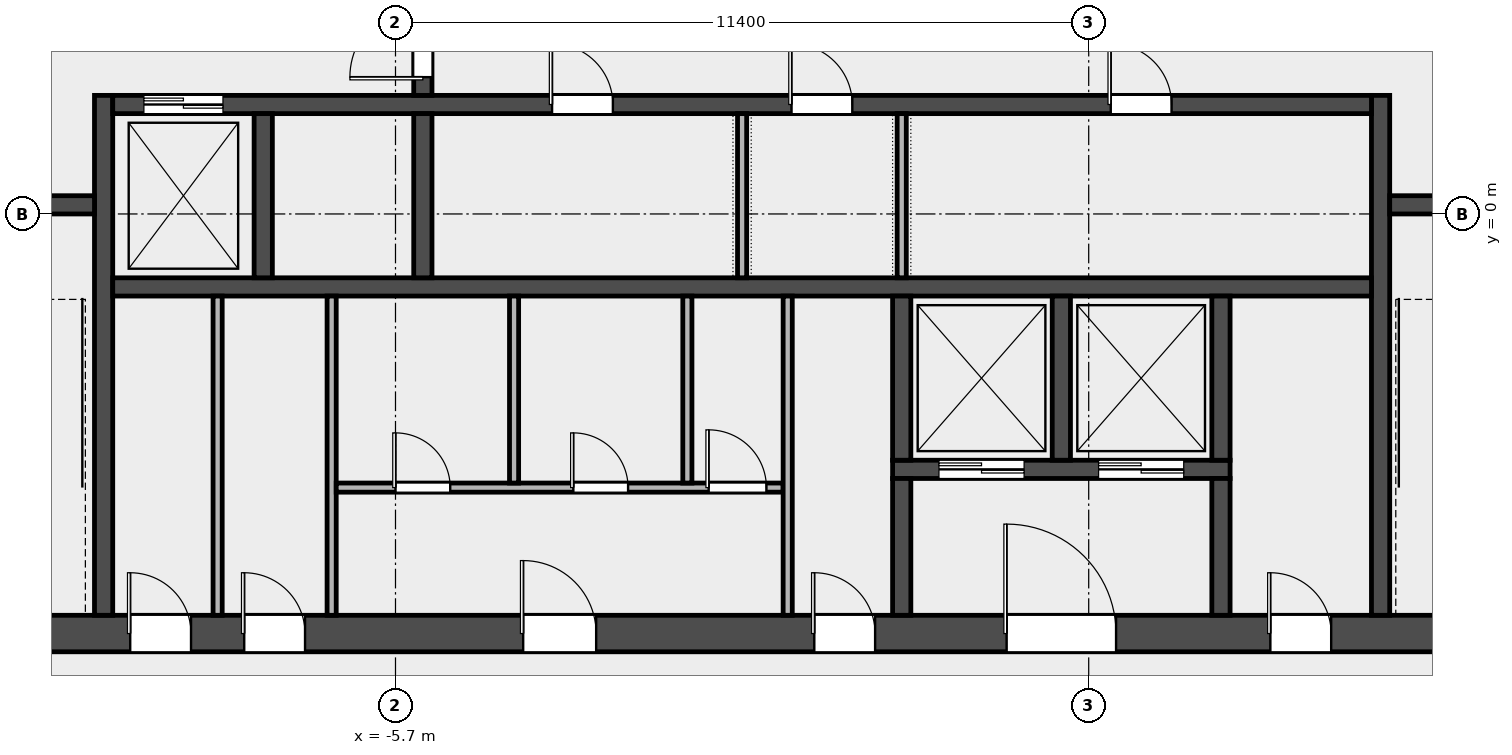
"""IFC4 building model, lengths in metres.
Left out: names, types, materials, properties, quantities, classifications, styles, units other than length and angle.
Written with IfcOpenShell. Run it as: python <this file> out.ifc"""

import sys

from ifc_helpers import new_model, si_unit, direction, frame, frame_2d, origin, place, context, subcontext, project, spatial, rectangle, extrude, element, fill, save


model = new_model("IFC4")
c1 = context("Model", 3, precision=1e-05, world=origin(), true_north=direction((0.0, 1.0)))
c2 = subcontext(c1, "Body", "Model", "MODEL_VIEW")
j1 = project(units=[si_unit("LENGTHUNIT", "METRE"), si_unit("PLANEANGLEUNIT", "RADIAN")], contexts=[c1])
p1 = place(None, origin())
s1 = spatial("IfcSite", under=j1, at=p1, CompositionType="ELEMENT")
p2 = place(p1, origin())
s2 = spatial("IfcBuilding", under=s1, at=p2, CompositionType="ELEMENT")
p3 = place(p2, frame((0.0, 0.0, 311.4)))
s3 = spatial("IfcBuildingStorey", under=s2, at=p3, CompositionType="ELEMENT", Elevation=311.4)
p4 = place(p3, frame((-14.4, -6.9, 0.0), z_axis=(0.0, 0.0, 1.0), x_axis=(1.0, 0.0, 0.0)))
e1 = element("IfcWall", 1, at=p4, inside=s3, PredefinedType="SHEAR", context=c2, shape_type="SweptSolid", body=[
    extrude(rectangle(XDim=28.8, YDim=0.6, at=frame_2d((14.4, 0.0))), origin(), (0.0, 0.0, 1.0), 3.7),
])
p5 = place(p4, frame((4.337, 0.0, 0.0)))
e2 = element("IfcOpeningElement", 2, at=p5, cuts=e1, PredefinedType="OPENING", context=c2, shape_type="SweptSolid", body=[
    extrude(rectangle(XDim=1.0, YDim=2.1, at=frame_2d((0.5, 1.05))), frame((0.0, 0.312, 0.0), z_axis=(0.0, -1.0, 0.0), x_axis=(1.0, 0.0, 0.0)), (0.0, 0.0, 1.0), 0.624),
])
p6 = place(p4, frame((6.212, 0.0, 0.0)))
e3 = element("IfcOpeningElement", 3, at=p6, cuts=e1, PredefinedType="OPENING", context=c2, shape_type="SweptSolid", body=[
    extrude(rectangle(XDim=1.0, YDim=2.1, at=frame_2d((0.5, 1.05))), frame((0.0, 0.312, 0.0), z_axis=(0.0, -1.0, 0.0), x_axis=(1.0, 0.0, 0.0)), (0.0, 0.0, 1.0), 0.624),
])
p7 = place(p4, frame((10.8, 0.0, 0.0)))
e4 = element("IfcOpeningElement", 4, at=p7, cuts=e1, PredefinedType="OPENING", context=c2, shape_type="SweptSolid", body=[
    extrude(rectangle(XDim=1.2, YDim=2.1, at=frame_2d((0.6, 1.05))), frame((0.0, 0.312, 0.0), z_axis=(0.0, -1.0, 0.0), x_axis=(1.0, 0.0, 0.0)), (0.0, 0.0, 1.0), 0.624),
])
p8 = place(p4, frame((15.587, 0.0, 0.0)))
e5 = element("IfcOpeningElement", 5, at=p8, cuts=e1, PredefinedType="OPENING", context=c2, shape_type="SweptSolid", body=[
    extrude(rectangle(XDim=1.0, YDim=2.1, at=frame_2d((0.5, 1.05))), frame((0.0, 0.312, 0.0), z_axis=(0.0, -1.0, 0.0), x_axis=(1.0, 0.0, 0.0)), (0.0, 0.0, 1.0), 0.624),
])
p9 = place(p4, frame((18.75, 0.0, 0.0)))
e6 = element("IfcOpeningElement", 6, at=p9, cuts=e1, PredefinedType="OPENING", context=c2, shape_type="SweptSolid", body=[
    extrude(rectangle(XDim=1.8, YDim=2.1, at=frame_2d((0.9, 1.05))), frame((0.0, 0.312, 0.0), z_axis=(0.0, -1.0, 0.0), x_axis=(1.0, 0.0, 0.0)), (0.0, 0.0, 1.0), 0.624),
])
p10 = place(p4, frame((23.087, 0.0, 0.0)))
e7 = element("IfcOpeningElement", 7, at=p10, cuts=e1, PredefinedType="OPENING", context=c2, shape_type="SweptSolid", body=[
    extrude(rectangle(XDim=1.0, YDim=2.1, at=frame_2d((0.5, 1.05))), frame((0.0, 0.312, 0.0), z_axis=(0.0, -1.0, 0.0), x_axis=(1.0, 0.0, 0.0)), (0.0, 0.0, 1.0), 0.624),
])
for number, where, z_axis, x_axis in (
    (8, (-10.5, -6.6, 0.0), (0.0, 0.0, 1.0), (0.0, 1.0, 0.0)),
    (9, (10.5, -6.6, 0.0), (0.0, 0.0, 1.0), (0.0, 1.0, 0.0)),
):
    element("IfcWall", number, at=place(p3, frame(where, z_axis=z_axis, x_axis=x_axis)), inside=s3, PredefinedType="SHEAR", context=c2, shape_type="SweptSolid", body=[
        extrude(rectangle(XDim=8.55, YDim=0.3, at=frame_2d((4.275, 0.0))), origin(), (0.0, 0.0, 1.0), 3.7),
    ])
p11 = place(p3, frame((-13.8, 0.15, 0.0), z_axis=(0.0, 0.0, 1.0), x_axis=(1.0, 0.0, 0.0)))
e10 = element("IfcWall", 10, at=p11, inside=s3, PredefinedType="SOLIDWALL", context=c2, shape_type="SweptSolid", body=[
    extrude(rectangle(XDim=3.15, YDim=0.3, at=frame_2d((1.575, 0.0))), origin(), (0.0, 0.0, 1.0), 3.7),
])
p12 = place(p11, frame((0.975, 0.0, 0.0)))
e11 = element("IfcOpeningElement", 11, at=p12, cuts=e10, PredefinedType="OPENING", context=c2, shape_type="SweptSolid", body=[
    extrude(rectangle(XDim=1.1, YDim=2.1, at=frame_2d((0.55, 1.05))), frame((0.0, 0.162, 0.0), z_axis=(0.0, -1.0, 0.0), x_axis=(1.0, 0.0, 0.0)), (0.0, 0.0, 1.0), 0.324),
])
p13 = place(p3, frame((10.65, 0.15, 0.0), z_axis=(0.0, 0.0, 1.0), x_axis=(1.0, 0.0, 0.0)))
e12 = element("IfcWall", 12, at=p13, inside=s3, PredefinedType="SOLIDWALL", context=c2, shape_type="SweptSolid", body=[
    extrude(rectangle(XDim=3.15, YDim=0.3, at=frame_2d((1.575, 0.0))), origin(), (0.0, 0.0, 1.0), 3.7),
])
p14 = place(p13, frame((1.025, 0.0, 0.0)))
e13 = element("IfcOpeningElement", 13, at=p14, cuts=e12, PredefinedType="OPENING", context=c2, shape_type="SweptSolid", body=[
    extrude(rectangle(XDim=1.1, YDim=2.1, at=frame_2d((0.55, 1.05))), frame((0.0, 0.162, 0.0), z_axis=(0.0, -1.0, 0.0), x_axis=(1.0, 0.0, 0.0)), (0.0, 0.0, 1.0), 0.324),
])
p15 = place(p3, frame((-10.35, -1.2, 0.0), z_axis=(0.0, 0.0, 1.0), x_axis=(1.0, 0.0, 0.0)))
e14 = element("IfcWall", 14, at=p15, inside=s3, PredefinedType="SOLIDWALL", context=c2, shape_type="SweptSolid", body=[
    extrude(rectangle(XDim=20.7, YDim=0.3, at=frame_2d((10.35, 0.0))), origin(), (0.0, 0.0, 1.0), 3.7),
])
p16 = place(p3, frame((-10.35, 1.8, 0.0), z_axis=(0.0, 0.0, 1.0), x_axis=(1.0, 0.0, 0.0)))
e15 = element("IfcWall", 15, at=p16, inside=s3, PredefinedType="SOLIDWALL", context=c2, shape_type="SweptSolid", body=[
    extrude(rectangle(XDim=20.7, YDim=0.3, at=frame_2d((10.35, 0.0))), origin(), (0.0, 0.0, 1.0), 3.7),
])
p17 = place(p16, frame((0.512, 0.0, 0.0)))
e16 = element("IfcOpeningElement", 16, at=p17, cuts=e15, PredefinedType="OPENING", context=c2, shape_type="SweptSolid", body=[
    extrude(rectangle(XDim=1.3, YDim=2.1, at=frame_2d((0.65, 1.05))), frame((0.0, 0.162, 0.0), z_axis=(0.0, -1.0, 0.0), x_axis=(1.0, 0.0, 0.0)), (0.0, 0.0, 1.0), 0.324),
])
p18 = place(p16, frame((7.225, 0.0, 0.0)))
e17 = element("IfcOpeningElement", 17, at=p18, cuts=e15, PredefinedType="OPENING", context=c2, shape_type="SweptSolid", body=[
    extrude(rectangle(XDim=1.0, YDim=2.1, at=frame_2d((0.5, 1.05))), frame((0.0, 0.162, 0.0), z_axis=(0.0, -1.0, 0.0), x_axis=(1.0, 0.0, 0.0)), (0.0, 0.0, 1.0), 0.324),
])
p19 = place(p16, frame((11.163, 0.0, 0.0)))
e18 = element("IfcOpeningElement", 18, at=p19, cuts=e15, PredefinedType="OPENING", context=c2, shape_type="SweptSolid", body=[
    extrude(rectangle(XDim=1.0, YDim=2.1, at=frame_2d((0.5, 1.05))), frame((0.0, 0.162, 0.0), z_axis=(0.0, -1.0, 0.0), x_axis=(1.0, 0.0, 0.0)), (0.0, 0.0, 1.0), 0.324),
])
p20 = place(p16, frame((16.413, 0.0, 0.0)))
e19 = element("IfcOpeningElement", 19, at=p20, cuts=e15, PredefinedType="OPENING", context=c2, shape_type="SweptSolid", body=[
    extrude(rectangle(XDim=1.0, YDim=2.1, at=frame_2d((0.5, 1.05))), frame((0.0, 0.162, 0.0), z_axis=(0.0, -1.0, 0.0), x_axis=(1.0, 0.0, 0.0)), (0.0, 0.0, 1.0), 0.324),
])
for number, where, z_axis, x_axis in (
    (20, (-7.875, -1.05, 0.0), (0.0, 0.0, 1.0), (0.0, 1.0, 0.0)),
    (21, (-5.25, -1.05, 0.0), (0.0, 0.0, 1.0), (0.0, 1.0, 0.0)),
):
    element("IfcWall", number, at=place(p3, frame(where, z_axis=z_axis, x_axis=x_axis)), inside=s3, PredefinedType="SOLIDWALL", context=c2, shape_type="SweptSolid", body=[
        extrude(rectangle(XDim=2.7, YDim=0.3, at=frame_2d((1.35, 0.0))), origin(), (0.0, 0.0, 1.0), 3.7),
    ])
p21 = place(p3, frame((-5.25, 1.95, 0.0), z_axis=(0.0, 0.0, 1.0), x_axis=(0.0, 1.0, 0.0)))
e22 = element("IfcWall", 22, at=p21, inside=s3, PredefinedType="SOLIDWALL", context=c2, shape_type="SweptSolid", body=[
    extrude(rectangle(XDim=3.3, YDim=0.3, at=frame_2d((1.65, 0.0))), origin(), (0.0, 0.0, 1.0), 3.7),
])
p22 = place(p21, frame((0.3, 0.0, 0.0)))
e23 = element("IfcOpeningElement", 23, at=p22, cuts=e22, PredefinedType="OPENING", context=c2, shape_type="SweptSolid", body=[
    extrude(rectangle(XDim=1.2, YDim=2.1, at=frame_2d((0.6, 1.05))), frame((0.0, 0.162, 0.0), z_axis=(0.0, -1.0, 0.0), x_axis=(1.0, 0.0, 0.0)), (0.0, 0.0, 1.0), 0.324),
])
p23 = place(p21, frame((1.8, 0.0, 0.0)))
e24 = element("IfcOpeningElement", 24, at=p23, cuts=e22, PredefinedType="OPENING", context=c2, shape_type="SweptSolid", body=[
    extrude(rectangle(XDim=1.2, YDim=2.1, at=frame_2d((0.6, 1.05))), frame((0.0, 0.162, 0.0), z_axis=(0.0, -1.0, 0.0), x_axis=(1.0, 0.0, 0.0)), (0.0, 0.0, 1.0), 0.324),
])
p24 = place(p3, frame((2.475, -4.2, 0.0), z_axis=(0.0, 0.0, 1.0), x_axis=(1.0, 0.0, 0.0)))
e25 = element("IfcWall", 25, at=p24, inside=s3, PredefinedType="SOLIDWALL", context=c2, shape_type="SweptSolid", body=[
    extrude(rectangle(XDim=5.55, YDim=0.3, at=frame_2d((2.775, 0.0))), origin(), (0.0, 0.0, 1.0), 3.7),
])
p25 = place(p24, frame((0.762, 0.0, 0.0)))
e26 = element("IfcOpeningElement", 26, at=p25, cuts=e25, PredefinedType="OPENING", context=c2, shape_type="SweptSolid", body=[
    extrude(rectangle(XDim=1.4, YDim=2.1, at=frame_2d((0.7, 1.05))), frame((0.0, 0.162, 0.0), z_axis=(0.0, -1.0, 0.0), x_axis=(1.0, 0.0, 0.0)), (0.0, 0.0, 1.0), 0.324),
])
p26 = place(p24, frame((3.387, 0.0, 0.0)))
e27 = element("IfcOpeningElement", 27, at=p26, cuts=e25, PredefinedType="OPENING", context=c2, shape_type="SweptSolid", body=[
    extrude(rectangle(XDim=1.4, YDim=2.1, at=frame_2d((0.7, 1.05))), frame((0.0, 0.162, 0.0), z_axis=(0.0, -1.0, 0.0), x_axis=(1.0, 0.0, 0.0)), (0.0, 0.0, 1.0), 0.324),
])
p27 = place(p3, frame((2.625, -4.05, 0.0), z_axis=(0.0, 0.0, 1.0), x_axis=(0.0, 1.0, 0.0)))
e28 = element("IfcWall", 28, at=p27, inside=s3, PredefinedType="SOLIDWALL", context=c2, shape_type="SweptSolid", body=[
    extrude(rectangle(XDim=2.7, YDim=0.3, at=frame_2d((1.35, 0.0))), origin(), (0.0, 0.0, 1.0), 3.7),
])
p28 = place(p3, frame((2.625, -6.6, 0.0), z_axis=(0.0, 0.0, 1.0), x_axis=(0.0, 1.0, 0.0)))
e29 = element("IfcWall", 29, at=p28, inside=s3, PredefinedType="SOLIDWALL", context=c2, shape_type="SweptSolid", body=[
    extrude(rectangle(XDim=2.25, YDim=0.3, at=frame_2d((1.125, 0.0))), origin(), (0.0, 0.0, 1.0), 3.7),
])
for number, where, z_axis, x_axis in (
    (30, (5.25, -4.05, 0.0), (0.0, 0.0, 1.0), (0.0, 1.0, 0.0)),
    (31, (7.875, -4.05, 0.0), (0.0, 0.0, 1.0), (0.0, 1.0, 0.0)),
):
    element("IfcWall", number, at=place(p3, frame(where, z_axis=z_axis, x_axis=x_axis)), inside=s3, PredefinedType="SOLIDWALL", context=c2, shape_type="SweptSolid", body=[
        extrude(rectangle(XDim=2.7, YDim=0.3, at=frame_2d((1.35, 0.0))), origin(), (0.0, 0.0, 1.0), 3.7),
    ])
p29 = place(p3, frame((7.875, -6.6, 0.0), z_axis=(0.0, 0.0, 1.0), x_axis=(0.0, 1.0, 0.0)))
e32 = element("IfcWall", 32, at=p29, inside=s3, PredefinedType="SOLIDWALL", context=c2, shape_type="SweptSolid", body=[
    extrude(rectangle(XDim=2.25, YDim=0.3, at=frame_2d((1.125, 0.0))), origin(), (0.0, 0.0, 1.0), 3.7),
])
for number, where, z_axis, x_axis in (
    (33, (-8.625, -6.6, 0.0), (0.0, 0.0, 1.0), (0.0, 1.0, 0.0)),
    (34, (-6.75, -6.6, 0.0), (0.0, 0.0, 1.0), (0.0, 1.0, 0.0)),
):
    element("IfcWall", number, at=place(p3, frame(where, z_axis=z_axis, x_axis=x_axis)), inside=s3, PredefinedType="PARTITIONING", context=c2, shape_type="SweptSolid", body=[
        extrude(rectangle(XDim=5.25, YDim=0.15, at=frame_2d((2.625, 0.0))), origin(), (0.0, 0.0, 1.0), 3.7),
    ])
p30 = place(p3, frame((-6.675, -4.5, 0.0), z_axis=(0.0, 0.0, 1.0), x_axis=(1.0, 0.0, 0.0)))
e35 = element("IfcWall", 35, at=p30, inside=s3, PredefinedType="PARTITIONING", context=c2, shape_type="SweptSolid", body=[
    extrude(rectangle(XDim=7.35, YDim=0.15, at=frame_2d((3.675, 0.0))), origin(), (0.0, 0.0, 1.0), 3.7),
])
p31 = place(p30, frame((0.975, 0.0, 0.0)))
e36 = element("IfcOpeningElement", 36, at=p31, cuts=e35, PredefinedType="OPENING", context=c2, shape_type="SweptSolid", body=[
    extrude(rectangle(XDim=0.9, YDim=2.1, at=frame_2d((0.45, 1.05))), frame((0.0, 0.087, 0.0), z_axis=(0.0, -1.0, 0.0), x_axis=(1.0, 0.0, 0.0)), (0.0, 0.0, 1.0), 0.174),
])
p32 = place(p30, frame((3.9, 0.0, 0.0)))
e37 = element("IfcOpeningElement", 37, at=p32, cuts=e35, PredefinedType="OPENING", context=c2, shape_type="SweptSolid", body=[
    extrude(rectangle(XDim=0.9, YDim=2.1, at=frame_2d((0.45, 1.05))), frame((0.0, 0.087, 0.0), z_axis=(0.0, -1.0, 0.0), x_axis=(1.0, 0.0, 0.0)), (0.0, 0.0, 1.0), 0.174),
])
p33 = place(p30, frame((6.125, 0.0, 0.0)))
e38 = element("IfcOpeningElement", 38, at=p33, cuts=e35, PredefinedType="OPENING", context=c2, shape_type="SweptSolid", body=[
    extrude(rectangle(XDim=0.95, YDim=2.1, at=frame_2d((0.475, 1.05))), frame((0.0, 0.087, 0.0), z_axis=(0.0, -1.0, 0.0), x_axis=(1.0, 0.0, 0.0)), (0.0, 0.0, 1.0), 0.174),
])
for number, where, z_axis, x_axis in (
    (39, (-3.75, -4.425, 0.0), (0.0, 0.0, 1.0), (0.0, 1.0, 0.0)),
    (40, (-0.9, -4.425, 0.0), (0.0, 0.0, 1.0), (0.0, 1.0, 0.0)),
):
    element("IfcWall", number, at=place(p3, frame(where, z_axis=z_axis, x_axis=x_axis)), inside=s3, PredefinedType="PARTITIONING", context=c2, shape_type="SweptSolid", body=[
        extrude(rectangle(XDim=3.075, YDim=0.15, at=frame_2d((1.538, 0.0))), origin(), (0.0, 0.0, 1.0), 3.7),
    ])
p34 = place(p3, frame((0.75, -6.6, 0.0), z_axis=(0.0, 0.0, 1.0), x_axis=(0.0, 1.0, 0.0)))
e41 = element("IfcWall", 41, at=p34, inside=s3, PredefinedType="PARTITIONING", context=c2, shape_type="SweptSolid", body=[
    extrude(rectangle(XDim=5.25, YDim=0.15, at=frame_2d((2.625, 0.0))), origin(), (0.0, 0.0, 1.0), 3.7),
])
for number, where, z_axis, x_axis in (
    (42, (0.0, -1.05, 0.0), (0.0, 0.0, 1.0), (0.0, 1.0, 0.0)),
    (43, (2.625, -1.05, 0.0), (0.0, 0.0, 1.0), (0.0, 1.0, 0.0)),
):
    element("IfcWall", number, at=place(p3, frame(where, z_axis=z_axis, x_axis=x_axis)), inside=s3, PredefinedType="PARTITIONING", context=c2, shape_type="SweptSolid", body=[
        extrude(rectangle(XDim=2.7, YDim=0.15, at=frame_2d((1.35, 0.0))), origin(), (0.0, 0.0, 1.0), 3.7),
    ])
p35 = place(p22, origin())
e44 = element("IfcDoor", 44, at=p35, inside=s3, OperationType="SINGLE_SWING_LEFT", PredefinedType="DOOR", context=c2, shape_type="SweptSolid", body=[
    extrude(rectangle(XDim=1.2, YDim=2.1, at=frame_2d((0.6, 1.05))), frame((0.0, 0.025, 0.0), z_axis=(0.0, -1.0, 0.0), x_axis=(1.0, 0.0, 0.0)), (0.0, 0.0, 1.0), 0.05),
])
fill(e23, e44)
p36 = place(p17, origin())
e45 = element("IfcDoor", 45, at=p36, inside=s3, OperationType="DOUBLE_DOOR_SLIDING", PredefinedType="DOOR", context=c2, shape_type="SweptSolid", body=[
    extrude(rectangle(XDim=1.3, YDim=2.1, at=frame_2d((0.65, 1.05))), frame((0.0, 0.025, 0.0), z_axis=(0.0, -1.0, 0.0), x_axis=(1.0, 0.0, 0.0)), (0.0, 0.0, 1.0), 0.05),
])
fill(e16, e45)
p37 = place(p25, origin())
e46 = element("IfcDoor", 46, at=p37, inside=s3, OperationType="DOUBLE_DOOR_SLIDING", PredefinedType="DOOR", context=c2, shape_type="SweptSolid", body=[
    extrude(rectangle(XDim=1.4, YDim=2.1, at=frame_2d((0.7, 1.05))), frame((0.0, 0.025, 0.0), z_axis=(0.0, -1.0, 0.0), x_axis=(1.0, 0.0, 0.0)), (0.0, 0.0, 1.0), 0.05),
])
fill(e26, e46)
p38 = place(p26, origin())
e47 = element("IfcDoor", 47, at=p38, inside=s3, OperationType="DOUBLE_DOOR_SLIDING", PredefinedType="DOOR", context=c2, shape_type="SweptSolid", body=[
    extrude(rectangle(XDim=1.4, YDim=2.1, at=frame_2d((0.7, 1.05))), frame((0.0, 0.025, 0.0), z_axis=(0.0, -1.0, 0.0), x_axis=(1.0, 0.0, 0.0)), (0.0, 0.0, 1.0), 0.05),
])
fill(e27, e47)
p39 = place(p5, origin())
e48 = element("IfcDoor", 48, at=p39, inside=s3, OperationType="SINGLE_SWING_LEFT", PredefinedType="DOOR", context=c2, shape_type="SweptSolid", body=[
    extrude(rectangle(XDim=1.0, YDim=2.1, at=frame_2d((0.5, 1.05))), frame((0.0, 0.025, 0.0), z_axis=(0.0, -1.0, 0.0), x_axis=(1.0, 0.0, 0.0)), (0.0, 0.0, 1.0), 0.05),
])
fill(e2, e48)
p40 = place(p6, origin())
e49 = element("IfcDoor", 49, at=p40, inside=s3, OperationType="SINGLE_SWING_LEFT", PredefinedType="DOOR", context=c2, shape_type="SweptSolid", body=[
    extrude(rectangle(XDim=1.0, YDim=2.1, at=frame_2d((0.5, 1.05))), frame((0.0, 0.025, 0.0), z_axis=(0.0, -1.0, 0.0), x_axis=(1.0, 0.0, 0.0)), (0.0, 0.0, 1.0), 0.05),
])
fill(e3, e49)
p41 = place(p7, origin())
e50 = element("IfcDoor", 50, at=p41, inside=s3, OperationType="SINGLE_SWING_LEFT", PredefinedType="DOOR", context=c2, shape_type="SweptSolid", body=[
    extrude(rectangle(XDim=1.2, YDim=2.1, at=frame_2d((0.6, 1.05))), frame((0.0, 0.025, 0.0), z_axis=(0.0, -1.0, 0.0), x_axis=(1.0, 0.0, 0.0)), (0.0, 0.0, 1.0), 0.05),
])
fill(e4, e50)
p42 = place(p31, origin())
e51 = element("IfcDoor", 51, at=p42, inside=s3, OperationType="SINGLE_SWING_LEFT", PredefinedType="DOOR", context=c2, shape_type="SweptSolid", body=[
    extrude(rectangle(XDim=0.9, YDim=2.1, at=frame_2d((0.45, 1.05))), frame((0.0, 0.025, 0.0), z_axis=(0.0, -1.0, 0.0), x_axis=(1.0, 0.0, 0.0)), (0.0, 0.0, 1.0), 0.05),
])
fill(e36, e51)
p43 = place(p32, origin())
e52 = element("IfcDoor", 52, at=p43, inside=s3, OperationType="SINGLE_SWING_LEFT", PredefinedType="DOOR", context=c2, shape_type="SweptSolid", body=[
    extrude(rectangle(XDim=0.9, YDim=2.1, at=frame_2d((0.45, 1.05))), frame((0.0, 0.025, 0.0), z_axis=(0.0, -1.0, 0.0), x_axis=(1.0, 0.0, 0.0)), (0.0, 0.0, 1.0), 0.05),
])
fill(e37, e52)
p44 = place(p33, origin())
e53 = element("IfcDoor", 53, at=p44, inside=s3, OperationType="SINGLE_SWING_LEFT", PredefinedType="DOOR", context=c2, shape_type="SweptSolid", body=[
    extrude(rectangle(XDim=0.95, YDim=2.1, at=frame_2d((0.475, 1.05))), frame((0.0, 0.025, 0.0), z_axis=(0.0, -1.0, 0.0), x_axis=(1.0, 0.0, 0.0)), (0.0, 0.0, 1.0), 0.05),
])
fill(e38, e53)
p45 = place(p8, origin())
e54 = element("IfcDoor", 54, at=p45, inside=s3, OperationType="SINGLE_SWING_LEFT", PredefinedType="DOOR", context=c2, shape_type="SweptSolid", body=[
    extrude(rectangle(XDim=1.0, YDim=2.1, at=frame_2d((0.5, 1.05))), frame((0.0, 0.025, 0.0), z_axis=(0.0, -1.0, 0.0), x_axis=(1.0, 0.0, 0.0)), (0.0, 0.0, 1.0), 0.05),
])
fill(e5, e54)
p46 = place(p9, origin())
e55 = element("IfcDoor", 55, at=p46, inside=s3, OperationType="DOUBLE_DOOR_SINGLE_SWING", PredefinedType="DOOR", context=c2, shape_type="SweptSolid", body=[
    extrude(rectangle(XDim=1.8, YDim=2.1, at=frame_2d((0.9, 1.05))), frame((0.0, 0.025, 0.0), z_axis=(0.0, -1.0, 0.0), x_axis=(1.0, 0.0, 0.0)), (0.0, 0.0, 1.0), 0.05),
])
fill(e6, e55)
p47 = place(p10, origin())
e56 = element("IfcDoor", 56, at=p47, inside=s3, OperationType="SINGLE_SWING_LEFT", PredefinedType="DOOR", context=c2, shape_type="SweptSolid", body=[
    extrude(rectangle(XDim=1.0, YDim=2.1, at=frame_2d((0.5, 1.05))), frame((0.0, 0.025, 0.0), z_axis=(0.0, -1.0, 0.0), x_axis=(1.0, 0.0, 0.0)), (0.0, 0.0, 1.0), 0.05),
])
fill(e7, e56)
p48 = place(p18, origin())
e57 = element("IfcDoor", 57, at=p48, inside=s3, OperationType="SINGLE_SWING_LEFT", PredefinedType="DOOR", context=c2, shape_type="SweptSolid", body=[
    extrude(rectangle(XDim=1.0, YDim=2.1, at=frame_2d((0.5, 1.05))), frame((0.0, 0.025, 0.0), z_axis=(0.0, -1.0, 0.0), x_axis=(1.0, 0.0, 0.0)), (0.0, 0.0, 1.0), 0.05),
])
fill(e17, e57)
p49 = place(p19, origin())
e58 = element("IfcDoor", 58, at=p49, inside=s3, OperationType="SINGLE_SWING_LEFT", PredefinedType="DOOR", context=c2, shape_type="SweptSolid", body=[
    extrude(rectangle(XDim=1.0, YDim=2.1, at=frame_2d((0.5, 1.05))), frame((0.0, 0.025, 0.0), z_axis=(0.0, -1.0, 0.0), x_axis=(1.0, 0.0, 0.0)), (0.0, 0.0, 1.0), 0.05),
])
fill(e18, e58)
p50 = place(p20, origin())
e59 = element("IfcDoor", 59, at=p50, inside=s3, OperationType="SINGLE_SWING_LEFT", PredefinedType="DOOR", context=c2, shape_type="SweptSolid", body=[
    extrude(rectangle(XDim=1.0, YDim=2.1, at=frame_2d((0.5, 1.05))), frame((0.0, 0.025, 0.0), z_axis=(0.0, -1.0, 0.0), x_axis=(1.0, 0.0, 0.0)), (0.0, 0.0, 1.0), 0.05),
])
fill(e19, e59)
save(model, sys.argv[1])
